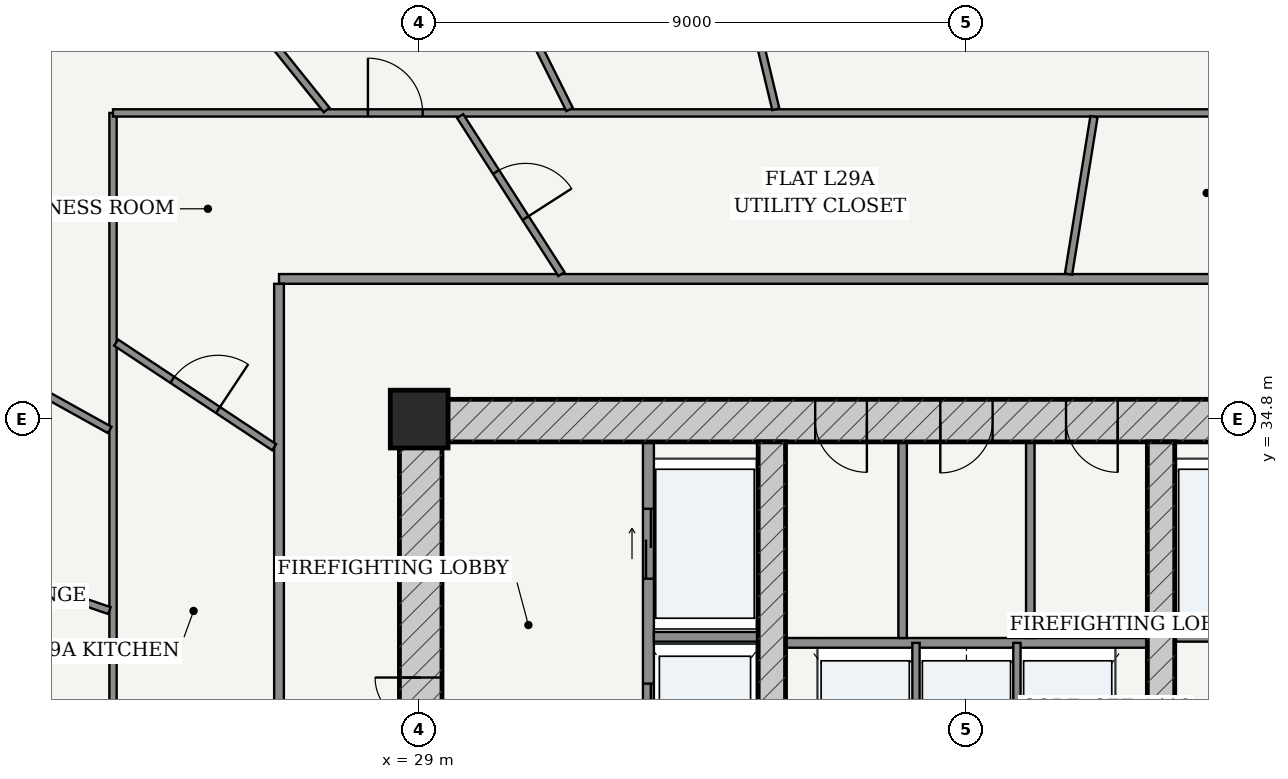
"""IFC4 building model, lengths in metres.
Left out: names, types, materials, properties, quantities, classifications, styles, units other than length and angle.
Written with IfcOpenShell. Run it as: python <this file> out.ifc"""

import sys

from ifc_helpers import new_model, si_unit, direction, frame, frame_2d, origin, origin_2d, place, context, subcontext, project, spatial, rectangle, extrude, source, transform, mapped, element, fill, save


model = new_model("IFC4")
c1 = context("Model", 3, precision=1e-05, world=origin(), true_north=direction((-0.2419218956, 0.970295726276)))
c2 = subcontext(c1, "Body", "Model", "MODEL_VIEW")
j1 = project(units=[si_unit("LENGTHUNIT", "METRE"), si_unit("PLANEANGLEUNIT", "RADIAN")], contexts=[c1])
p1 = place(None, origin())
s1 = spatial("IfcSite", under=j1, at=p1, CompositionType="ELEMENT")
p2 = place(p1, origin())
s2 = spatial("IfcBuilding", under=s1, at=p2, CompositionType="ELEMENT")
p3 = place(p2, frame((0.0, 0.0, 112.2)))
s3 = spatial("IfcBuildingStorey", under=s2, at=p3, CompositionType="ELEMENT", Elevation=112.2)
p4 = place(p3, frame((29.0, 34.8, 0.0), z_axis=(0.0, 0.0, 1.0), x_axis=(1.0, 0.0, 0.0)))
e1 = element("IfcColumn", 1, at=p4, inside=s3, PredefinedType="COLUMN", context=c2, shape_type="SweptSolid", body=[
    extrude(rectangle(XDim=0.95, YDim=0.95, at=origin_2d()), origin(), (0.0, 0.0, 1.0), 3.6),
])
p5 = place(p3, frame((28.675, 34.775, 0.0), z_axis=(0.0, 0.0, 1.0), x_axis=(1.0, 0.0, 0.0)))
e2 = element("IfcWall", 2, at=p5, inside=s3, PredefinedType="SHEAR", context=c2, shape_type="SweptSolid", body=[
    extrude(rectangle(XDim=18.65, YDim=0.7, at=frame_2d((9.325, 0.0))), origin(), (0.0, 0.0, 1.0), 3.325),
])
p6 = place(p5, frame((6.837, 0.0, 0.0)))
e3 = element("IfcOpeningElement", 3, at=p6, cuts=e2, PredefinedType="OPENING", context=c2, shape_type="SweptSolid", body=[
    extrude(rectangle(XDim=0.85, YDim=2.1, at=frame_2d((0.425, 1.05))), frame((0.0, 0.36, 0.0), z_axis=(0.0, -1.0, 0.0), x_axis=(1.0, 0.0, 0.0)), (0.0, 0.0, 1.0), 0.72),
])
p7 = place(p5, frame((8.895, 0.0, 0.0)))
e4 = element("IfcOpeningElement", 4, at=p7, cuts=e2, PredefinedType="OPENING", context=c2, shape_type="SweptSolid", body=[
    extrude(rectangle(XDim=0.86, YDim=2.1, at=frame_2d((0.43, 1.05))), frame((0.0, 0.36, 0.0), z_axis=(0.0, -1.0, 0.0), x_axis=(1.0, 0.0, 0.0)), (0.0, 0.0, 1.0), 0.72),
])
p8 = place(p5, frame((10.962, 0.0, 0.0)))
e5 = element("IfcOpeningElement", 5, at=p8, cuts=e2, PredefinedType="OPENING", context=c2, shape_type="SweptSolid", body=[
    extrude(rectangle(XDim=0.85, YDim=2.1, at=frame_2d((0.425, 1.05))), frame((0.0, 0.36, 0.0), z_axis=(0.0, -1.0, 0.0), x_axis=(1.0, 0.0, 0.0)), (0.0, 0.0, 1.0), 0.72),
])
p9 = place(p3, frame((29.025, 19.175, 0.0), z_axis=(0.0, 0.0, 1.0), x_axis=(0.0, 1.0, 0.0)))
e6 = element("IfcWall", 6, at=p9, inside=s3, PredefinedType="SHEAR", context=c2, shape_type="SweptSolid", body=[
    extrude(rectangle(XDim=15.25, YDim=0.7, at=frame_2d((7.625, 0.0))), origin(), (0.0, 0.0, 1.0), 3.325),
])
p10 = place(p9, frame((9.875, 0.0, 0.0)))
e7 = element("IfcOpeningElement", 7, at=p10, cuts=e6, PredefinedType="OPENING", context=c2, shape_type="SweptSolid", body=[
    extrude(rectangle(XDim=1.5, YDim=2.2, at=frame_2d((0.75, 1.1))), frame((0.0, 0.36, 0.0), z_axis=(0.0, -1.0, 0.0), x_axis=(1.0, 0.0, 0.0)), (0.0, 0.0, 1.0), 0.72),
])
p11 = place(p3, frame((34.8, 19.175, 0.0), z_axis=(0.0, 0.0, 1.0), x_axis=(0.0, 1.0, 0.0)))
e8 = element("IfcWall", 8, at=p11, inside=s3, PredefinedType="SHEAR", context=c2, shape_type="SweptSolid", body=[
    extrude(rectangle(XDim=15.25, YDim=0.45, at=frame_2d((7.625, 0.0))), origin(), (0.0, 0.0, 1.0), 3.325),
])
p12 = place(p11, frame((7.8, 0.0, 0.0)))
e9 = element("IfcOpeningElement", 9, at=p12, cuts=e8, PredefinedType="OPENING", context=c2, shape_type="SweptSolid", body=[
    extrude(rectangle(XDim=1.05, YDim=2.15, at=frame_2d((0.525, 1.075))), frame((0.0, 0.235, 0.0), z_axis=(0.0, -1.0, 0.0), x_axis=(1.0, 0.0, 0.0)), (0.0, 0.0, 1.0), 0.47),
])
p13 = place(p3, frame((41.2, 19.175, 0.0), z_axis=(0.0, 0.0, 1.0), x_axis=(0.0, 1.0, 0.0)))
e10 = element("IfcWall", 10, at=p13, inside=s3, PredefinedType="SHEAR", context=c2, shape_type="SweptSolid", body=[
    extrude(rectangle(XDim=15.25, YDim=0.45, at=frame_2d((7.625, 0.0))), origin(), (0.0, 0.0, 1.0), 3.325),
])
p14 = place(p13, frame((7.8, 0.0, 0.0)))
e11 = element("IfcOpeningElement", 11, at=p14, cuts=e10, PredefinedType="OPENING", context=c2, shape_type="SweptSolid", body=[
    extrude(rectangle(XDim=1.05, YDim=2.15, at=frame_2d((0.525, 1.075))), frame((0.0, 0.235, 0.0), z_axis=(0.0, -1.0, 0.0), x_axis=(1.0, 0.0, 0.0)), (0.0, 0.0, 1.0), 0.47),
])
p15 = place(p3, frame((23.3, 45.202, 0.0), z_axis=(0.0, 0.0, 1.0), x_axis=(-0.769242574941, -0.638956853706, 0.0)))
e12 = element("IfcWall", 12, at=p15, inside=s3, PredefinedType="SOLIDWALL", context=c2, shape_type="SweptSolid", body=[
    extrude(rectangle(XDim=9.69, YDim=0.28, at=frame_2d((4.845, 0.0))), origin(), (0.0, 0.0, 1.0), 3.325),
])
p16 = place(p15, frame((1.566, 0.0, 0.85)))
e13 = element("IfcOpeningElement", 13, at=p16, cuts=e12, PredefinedType="OPENING", context=c2, shape_type="SweptSolid", body=[
    extrude(rectangle(XDim=2.1, YDim=1.95, at=frame_2d((1.05, 0.975))), frame((0.0, 0.15, 0.0), z_axis=(0.0, -1.0, 0.0), x_axis=(1.0, 0.0, 0.0)), (0.0, 0.0, 1.0), 0.3),
])
p17 = place(p15, frame((6.023, 0.0, 0.85)))
e14 = element("IfcOpeningElement", 14, at=p17, cuts=e12, PredefinedType="OPENING", context=c2, shape_type="SweptSolid", body=[
    extrude(rectangle(XDim=2.1, YDim=1.95, at=frame_2d((1.05, 0.975))), frame((0.0, 0.15, 0.0), z_axis=(0.0, -1.0, 0.0), x_axis=(1.0, 0.0, 0.0)), (0.0, 0.0, 1.0), 0.3),
])
p18 = place(p3, frame((32.77, 28.52, 0.0), z_axis=(0.0, 0.0, 1.0), x_axis=(0.0, 1.0, 0.0)))
e15 = element("IfcWall", 15, at=p18, inside=s3, PredefinedType="PARTITIONING", context=c2, shape_type="SweptSolid", body=[
    extrude(rectangle(XDim=5.905, YDim=0.18, at=frame_2d((2.953, 0.0))), origin(), (0.0, 0.0, 1.0), 3.325),
])
p19 = place(p18, frame((3.655, 0.0, 0.0)))
e16 = element("IfcOpeningElement", 16, at=p19, cuts=e15, PredefinedType="OPENING", context=c2, shape_type="SweptSolid", body=[
    extrude(rectangle(XDim=1.15, YDim=2.2, at=frame_2d((0.575, 1.1))), frame((0.0, 0.1, 0.0), z_axis=(0.0, -1.0, 0.0), x_axis=(1.0, 0.0, 0.0)), (0.0, 0.0, 1.0), 0.2),
])
p20 = place(p18, frame((0.73, 0.0, 0.0)))
e17 = element("IfcOpeningElement", 17, at=p20, cuts=e15, PredefinedType="OPENING", context=c2, shape_type="SweptSolid", body=[
    extrude(rectangle(XDim=1.2, YDim=2.25, at=frame_2d((0.6, 1.125))), frame((0.0, 0.1, 0.0), z_axis=(0.0, -1.0, 0.0), x_axis=(1.0, 0.0, 0.0)), (0.0, 0.0, 1.0), 0.2),
])
for number, where, z_axis, x_axis in (
    (18, (32.86, 31.22, 0.0), (0.0, 0.0, 1.0), (1.0, 0.0, 0.0)),
    (19, (41.425, 31.22, 0.0), (0.0, 0.0, 1.0), (1.0, 0.0, 0.0)),
):
    element("IfcWall", number, at=place(p3, frame(where, z_axis=z_axis, x_axis=x_axis)), inside=s3, PredefinedType="PARTITIONING", context=c2, shape_type="SweptSolid", body=[
        extrude(rectangle(XDim=1.715, YDim=0.16, at=frame_2d((0.857, 0.0))), origin(), (0.0, 0.0, 1.0), 3.325),
    ])
p21 = place(p3, frame((35.025, 31.12, 0.0), z_axis=(0.0, 0.0, 1.0), x_axis=(1.0, 0.0, 0.0)))
e20 = element("IfcWall", 20, at=p21, inside=s3, PredefinedType="PARTITIONING", context=c2, shape_type="SweptSolid", body=[
    extrude(rectangle(XDim=5.95, YDim=0.16, at=frame_2d((2.975, 0.0))), origin(), (0.0, 0.0, 1.0), 3.325),
])
for number, where, z_axis, x_axis in (
    (21, (37.17, 28.56, 0.0), (0.0, 0.0, 1.0), (0.0, 1.0, 0.0)),
    (22, (38.83, 28.56, 0.0), (0.0, 0.0, 1.0), (0.0, 1.0, 0.0)),
):
    element("IfcWall", number, at=place(p3, frame(where, z_axis=z_axis, x_axis=x_axis)), inside=s3, PredefinedType="PARTITIONING", context=c2, shape_type="SweptSolid", body=[
        extrude(rectangle(XDim=2.56, YDim=0.12, at=frame_2d((1.28, 0.0))), origin(), (0.0, 0.0, 1.0), 3.325),
    ])
for number, where, z_axis, x_axis in (
    (23, (36.95, 31.2, 0.0), (0.0, 0.0, 1.0), (0.0, 1.0, 0.0)),
    (24, (39.05, 31.2, 0.0), (0.0, 0.0, 1.0), (0.0, 1.0, 0.0)),
):
    element("IfcWall", number, at=place(p3, frame(where, z_axis=z_axis, x_axis=x_axis)), inside=s3, PredefinedType="PARTITIONING", context=c2, shape_type="SweptSolid", body=[
        extrude(rectangle(XDim=3.225, YDim=0.14, at=frame_2d((1.613, 0.0))), origin(), (0.0, 0.0, 1.0), 3.325),
    ])
p22 = place(p3, frame((26.695, 37.105, 0.0), z_axis=(0.0, 0.0, 1.0), x_axis=(1.0, 0.0, 0.0)))
e25 = element("IfcWall", 25, at=p22, inside=s3, PredefinedType="PARTITIONING", context=c2, shape_type="SweptSolid", body=[
    extrude(rectangle(XDim=22.61, YDim=0.16, at=frame_2d((11.305, 0.0))), origin(), (0.0, 0.0, 1.0), 2.767),
])
p23 = place(p3, frame((26.695, 16.575, 0.0), z_axis=(0.0, 0.0, 1.0), x_axis=(0.0, 1.0, 0.0)))
e26 = element("IfcWall", 26, at=p23, inside=s3, PredefinedType="PARTITIONING", context=c2, shape_type="SweptSolid", body=[
    extrude(rectangle(XDim=20.45, YDim=0.16, at=frame_2d((10.225, 0.0))), origin(), (0.0, 0.0, 1.0), 2.767),
])
p24 = place(p23, frame((2.424, 0.0, 0.0)))
e27 = element("IfcOpeningElement", 27, at=p24, cuts=e26, PredefinedType="OPENING", context=c2, shape_type="SweptSolid", body=[
    extrude(rectangle(XDim=0.98, YDim=2.2, at=frame_2d((0.49, 1.1))), frame((0.0, 0.09, 0.0), z_axis=(0.0, -1.0, 0.0), x_axis=(1.0, 0.0, 0.0)), (0.0, 0.0, 1.0), 0.18),
])
p25 = place(p3, frame((23.965, 13.765, 0.0), z_axis=(0.0, 0.0, 1.0), x_axis=(0.0, 1.0, 0.0)))
e28 = element("IfcWall", 28, at=p25, inside=s3, PredefinedType="PARTITIONING", context=c2, shape_type="SweptSolid", body=[
    extrude(rectangle(XDim=26.07, YDim=0.12, at=frame_2d((13.035, 0.0))), origin(), (0.0, 0.0, 1.0), 2.767),
])
p26 = place(p25, frame((3.362, 0.0, 0.0)))
e29 = element("IfcOpeningElement", 29, at=p26, cuts=e28, PredefinedType="OPENING", context=c2, shape_type="SweptSolid", body=[
    extrude(rectangle(XDim=0.9, YDim=2.15, at=frame_2d((0.45, 1.075))), frame((0.0, 0.07, 0.0), z_axis=(0.0, -1.0, 0.0), x_axis=(1.0, 0.0, 0.0)), (0.0, 0.0, 1.0), 0.14),
])
p27 = place(p25, frame((13.924, 0.0, 0.0)))
e30 = element("IfcOpeningElement", 30, at=p27, cuts=e28, PredefinedType="OPENING", context=c2, shape_type="SweptSolid", body=[
    extrude(rectangle(XDim=0.9, YDim=2.15, at=frame_2d((0.45, 1.075))), frame((0.0, 0.07, 0.0), z_axis=(0.0, -1.0, 0.0), x_axis=(1.0, 0.0, 0.0)), (0.0, 0.0, 1.0), 0.14),
])
p28 = place(p3, frame((23.965, 39.835, 0.0), z_axis=(0.0, 0.0, 1.0), x_axis=(1.0, 0.0, 0.0)))
e31 = element("IfcWall", 31, at=p28, inside=s3, PredefinedType="PARTITIONING", context=c2, shape_type="SweptSolid", body=[
    extrude(rectangle(XDim=24.416, YDim=0.12, at=frame_2d((12.208, 0.0))), origin(), (0.0, 0.0, 1.0), 2.767),
])
p29 = place(p28, frame((4.192, 0.0, 0.0)))
e32 = element("IfcOpeningElement", 32, at=p29, cuts=e31, PredefinedType="OPENING", context=c2, shape_type="SweptSolid", body=[
    extrude(rectangle(XDim=0.9, YDim=2.15, at=frame_2d((0.45, 1.075))), frame((0.0, 0.07, 0.0), z_axis=(0.0, -1.0, 0.0), x_axis=(1.0, 0.0, 0.0)), (0.0, 0.0, 1.0), 0.14),
])
p30 = place(p28, frame((19.728, 0.0, 0.0)))
e33 = element("IfcOpeningElement", 33, at=p30, cuts=e31, PredefinedType="OPENING", context=c2, shape_type="SweptSolid", body=[
    extrude(rectangle(XDim=0.86, YDim=2.15, at=frame_2d((0.43, 1.075))), frame((0.0, 0.07, 0.0), z_axis=(0.0, -1.0, 0.0), x_axis=(1.0, 0.0, 0.0)), (0.0, 0.0, 1.0), 0.14),
])
p31 = place(p3, frame((34.865, 39.895, 0.0), z_axis=(0.0, 0.0, 1.0), x_axis=(-0.23282725047, 0.97251810854, 0.0)))
e34 = element("IfcWall", 34, at=p31, inside=s3, PredefinedType="PARTITIONING", context=c2, shape_type="SweptSolid", body=[
    extrude(rectangle(XDim=8.715, YDim=0.12, at=frame_2d((4.357, 0.0))), origin(), (0.0, 0.0, 1.0), 2.767),
])
p32 = place(p31, frame((2.831, 0.0, 0.0)))
e35 = element("IfcOpeningElement", 35, at=p32, cuts=e34, PredefinedType="OPENING", context=c2, shape_type="SweptSolid", body=[
    extrude(rectangle(XDim=0.9, YDim=2.15, at=frame_2d((0.45, 1.075))), frame((0.0, 0.07, 0.0), z_axis=(0.0, -1.0, 0.0), x_axis=(1.0, 0.0, 0.0)), (0.0, 0.0, 1.0), 0.14),
])
p33 = place(p3, frame((31.474, 39.89, 0.0), z_axis=(0.0, 0.0, 1.0), x_axis=(-0.446167584581, 0.894949432353, 0.0)))
e36 = element("IfcWall", 36, at=p33, inside=s3, PredefinedType="PARTITIONING", context=c2, shape_type="SweptSolid", body=[
    extrude(rectangle(XDim=8.125, YDim=0.12, at=frame_2d((4.062, 0.0))), origin(), (0.0, 0.0, 1.0), 2.767),
])
p34 = place(p33, frame((3.612, 0.0, 0.0)))
e37 = element("IfcOpeningElement", 37, at=p34, cuts=e36, PredefinedType="OPENING", context=c2, shape_type="SweptSolid", body=[
    extrude(rectangle(XDim=0.9, YDim=2.15, at=frame_2d((0.45, 1.075))), frame((0.0, 0.07, 0.0), z_axis=(0.0, -1.0, 0.0), x_axis=(1.0, 0.0, 0.0)), (0.0, 0.0, 1.0), 0.14),
])
p35 = place(p3, frame((27.478, 39.883, 0.0), z_axis=(0.0, 0.0, 1.0), x_axis=(-0.62672583251, 0.779239841682, 0.0)))
e38 = element("IfcWall", 38, at=p35, inside=s3, PredefinedType="PARTITIONING", context=c2, shape_type="SweptSolid", body=[
    extrude(rectangle(XDim=6.678, YDim=0.12, at=frame_2d((3.339, 0.0))), origin(), (0.0, 0.0, 1.0), 2.767),
])
p36 = place(p35, frame((1.821, 0.0, 0.0)))
e39 = element("IfcOpeningElement", 39, at=p36, cuts=e38, PredefinedType="OPENING", context=c2, shape_type="SweptSolid", body=[
    extrude(rectangle(XDim=0.9, YDim=2.15, at=frame_2d((0.45, 1.075))), frame((0.0, 0.07, 0.0), z_axis=(0.0, -1.0, 0.0), x_axis=(1.0, 0.0, 0.0)), (0.0, 0.0, 1.0), 0.14),
])
p37 = place(p3, frame((23.911, 34.622, 0.0), z_axis=(0.0, 0.0, 1.0), x_axis=(-0.874324904351, 0.485341077626, 0.0)))
e40 = element("IfcWall", 40, at=p37, inside=s3, PredefinedType="PARTITIONING", context=c2, shape_type="SweptSolid", body=[
    extrude(rectangle(XDim=9.066, YDim=0.12, at=frame_2d((4.533, 0.0))), origin(), (0.0, 0.0, 1.0), 2.767),
])
p38 = place(p3, frame((23.906, 31.65, 0.0), z_axis=(0.0, 0.0, 1.0), x_axis=(-0.945573120726, 0.32540970078, 0.0)))
e41 = element("IfcWall", 41, at=p38, inside=s3, PredefinedType="PARTITIONING", context=c2, shape_type="SweptSolid", body=[
    extrude(rectangle(XDim=11.022, YDim=0.12, at=frame_2d((5.511, 0.0))), origin(), (0.0, 0.0, 1.0), 2.767),
])
p39 = place(p38, frame((5.061, 0.0, 0.0)))
e42 = element("IfcOpeningElement", 42, at=p39, cuts=e41, PredefinedType="OPENING", context=c2, shape_type="SweptSolid", body=[
    extrude(rectangle(XDim=0.9, YDim=2.15, at=frame_2d((0.45, 1.075))), frame((0.0, 0.07, 0.0), z_axis=(0.0, -1.0, 0.0), x_axis=(1.0, 0.0, 0.0)), (0.0, 0.0, 1.0), 0.14),
])
p40 = place(p3, frame((23.904, 29.13, 0.0), z_axis=(0.0, 0.0, 1.0), x_axis=(-0.986618264768, 0.163047231274, 0.0)))
e43 = element("IfcWall", 43, at=p40, inside=s3, PredefinedType="PARTITIONING", context=c2, shape_type="SweptSolid", body=[
    extrude(rectangle(XDim=12.039, YDim=0.12, at=frame_2d((6.02, 0.0))), origin(), (0.0, 0.0, 1.0), 2.767),
])
p41 = place(p40, frame((4.496, 0.0, 0.0)))
e44 = element("IfcOpeningElement", 44, at=p41, cuts=e43, PredefinedType="OPENING", context=c2, shape_type="SweptSolid", body=[
    extrude(rectangle(XDim=0.9, YDim=2.15, at=frame_2d((0.45, 1.075))), frame((0.0, 0.07, 0.0), z_axis=(0.0, -1.0, 0.0), x_axis=(1.0, 0.0, 0.0)), (0.0, 0.0, 1.0), 0.14),
])
p42 = place(p3, frame((39.679, 37.185, 0.0), z_axis=(0.0, 0.0, 1.0), x_axis=(0.159580767408, 0.98718487563, 0.0)))
e45 = element("IfcWall", 45, at=p42, inside=s3, PredefinedType="PARTITIONING", context=c2, shape_type="SweptSolid", body=[
    extrude(rectangle(XDim=2.622, YDim=0.12, at=frame_2d((1.311, 0.0))), origin(), (0.0, 0.0, 1.0), 3.325),
])
p43 = place(p3, frame((31.34, 37.185, 0.0), z_axis=(0.0, 0.0, 1.0), x_axis=(-0.539861631895, 0.841753775405, 0.0)))
e46 = element("IfcWall", 46, at=p43, inside=s3, PredefinedType="PARTITIONING", context=c2, shape_type="SweptSolid", body=[
    extrude(rectangle(XDim=3.086, YDim=0.12, at=frame_2d((1.543, 0.0))), origin(), (0.0, 0.0, 1.0), 3.325),
])
p44 = place(p43, frame((1.093, 0.0, 0.0)))
e47 = element("IfcOpeningElement", 47, at=p44, cuts=e46, PredefinedType="OPENING", context=c2, shape_type="SweptSolid", body=[
    extrude(rectangle(XDim=0.9, YDim=2.15, at=frame_2d((0.45, 1.075))), frame((0.0, 0.07, 0.0), z_axis=(0.0, -1.0, 0.0), x_axis=(1.0, 0.0, 0.0)), (0.0, 0.0, 1.0), 0.14),
])
p45 = place(p3, frame((26.615, 34.337, 0.0), z_axis=(0.0, 0.0, 1.0), x_axis=(-0.833829855758, 0.552021531868, 0.0)))
e48 = element("IfcWall", 48, at=p45, inside=s3, PredefinedType="PARTITIONING", context=c2, shape_type="SweptSolid", body=[
    extrude(rectangle(XDim=3.116, YDim=0.12, at=frame_2d((1.558, 0.0))), origin(), (0.0, 0.0, 1.0), 3.325),
])
p46 = place(p45, frame((1.108, 0.0, 0.0)))
e49 = element("IfcOpeningElement", 49, at=p46, cuts=e48, PredefinedType="OPENING", context=c2, shape_type="SweptSolid", body=[
    extrude(rectangle(XDim=0.9, YDim=2.15, at=frame_2d((0.45, 1.075))), frame((0.0, 0.07, 0.0), z_axis=(0.0, -1.0, 0.0), x_axis=(1.0, 0.0, 0.0)), (0.0, 0.0, 1.0), 0.14),
])
m1 = source(origin(), c2, "Body", "SweptSolid", [
    extrude(rectangle(XDim=1.5, YDim=2.2, at=frame_2d((0.75, 1.1))), frame((0.0, 0.025, 0.0), z_axis=(0.0, -1.0, 0.0), x_axis=(1.0, 0.0, 0.0)), (0.0, 0.0, 1.0), 0.05),
])
p47 = place(p10, origin())
e50 = element("IfcDoor", 50, at=p47, inside=s3, OperationType="DOUBLE_DOOR_SINGLE_SWING", PredefinedType="DOOR", context=c2, shape_type="MappedRepresentation", body=[
    mapped(m1, transform((0.0, 0.0, 0.0), scale=1.0)),
])
fill(e7, e50)
m2 = source(origin(), c2, "Body", "SweptSolid", [
    extrude(rectangle(XDim=0.85, YDim=2.1, at=frame_2d((0.425, 1.05))), frame((0.0, 0.025, 0.0), z_axis=(0.0, -1.0, 0.0), x_axis=(1.0, 0.0, 0.0)), (0.0, 0.0, 1.0), 0.05),
])
p48 = place(p6, frame((0.85, 0.0, 0.0), z_axis=(0.0, 0.0, 1.0), x_axis=(-1.0, 0.0, 0.0)))
e51 = element("IfcDoor", 51, at=p48, inside=s3, OperationType="SINGLE_SWING_LEFT", PredefinedType="DOOR", context=c2, shape_type="MappedRepresentation", body=[
    mapped(m2, transform((0.0, 0.0, 0.0), scale=1.0)),
])
fill(e3, e51)
m3 = source(origin(), c2, "Body", "SweptSolid", [
    extrude(rectangle(XDim=0.86, YDim=2.1, at=frame_2d((0.43, 1.05))), frame((0.0, 0.025, 0.0), z_axis=(0.0, -1.0, 0.0), x_axis=(1.0, 0.0, 0.0)), (0.0, 0.0, 1.0), 0.05),
])
p49 = place(p7, frame((0.86, 0.0, 0.0), z_axis=(0.0, 0.0, 1.0), x_axis=(-1.0, 0.0, 0.0)))
e52 = element("IfcDoor", 52, at=p49, inside=s3, OperationType="SINGLE_SWING_RIGHT", PredefinedType="DOOR", context=c2, shape_type="MappedRepresentation", body=[
    mapped(m3, transform((0.0, 0.0, 0.0), scale=1.0)),
])
fill(e4, e52)
p50 = place(p8, frame((0.85, 0.0, 0.0), z_axis=(0.0, 0.0, 1.0), x_axis=(-1.0, 0.0, 0.0)))
e53 = element("IfcDoor", 53, at=p50, inside=s3, OperationType="SINGLE_SWING_LEFT", PredefinedType="DOOR", context=c2, shape_type="MappedRepresentation", body=[
    mapped(m2, transform((0.0, 0.0, 0.0), scale=1.0)),
])
fill(e5, e53)
m4 = source(origin(), c2, "Body", "SweptSolid", [
    extrude(rectangle(XDim=1.15, YDim=2.2, at=frame_2d((0.575, 1.1))), frame((0.0, 0.025, 0.0), z_axis=(0.0, -1.0, 0.0), x_axis=(1.0, 0.0, 0.0)), (0.0, 0.0, 1.0), 0.05),
])
p51 = place(p19, origin())
e54 = element("IfcDoor", 54, at=p51, inside=s3, OperationType="DOUBLE_DOOR_SLIDING", PredefinedType="DOOR", context=c2, shape_type="MappedRepresentation", body=[
    mapped(m4, transform((0.0, 0.0, 0.0), scale=1.0)),
])
fill(e16, e54)
m5 = source(origin(), c2, "Body", "SweptSolid", [
    extrude(rectangle(XDim=1.2, YDim=2.25, at=frame_2d((0.6, 1.125))), frame((0.0, 0.025, 0.0), z_axis=(0.0, -1.0, 0.0), x_axis=(1.0, 0.0, 0.0)), (0.0, 0.0, 1.0), 0.05),
])
p52 = place(p20, origin())
e55 = element("IfcDoor", 55, at=p52, inside=s3, OperationType="DOUBLE_DOOR_SLIDING", PredefinedType="DOOR", context=c2, shape_type="MappedRepresentation", body=[
    mapped(m5, transform((0.0, 0.0, 0.0), scale=1.0)),
])
fill(e17, e55)
m6 = source(origin(), c2, "Body", "SweptSolid", [
    extrude(rectangle(XDim=0.9, YDim=2.15, at=frame_2d((0.45, 1.075))), frame((0.0, 0.025, 0.0), z_axis=(0.0, -1.0, 0.0), x_axis=(1.0, 0.0, 0.0)), (0.0, 0.0, 1.0), 0.05),
])
p53 = place(p46, frame((0.9, 0.0, 0.0), z_axis=(0.0, 0.0, 1.0), x_axis=(-1.0, 0.0, 0.0)))
e56 = element("IfcDoor", 56, at=p53, inside=s3, OperationType="SINGLE_SWING_RIGHT", PredefinedType="DOOR", context=c2, shape_type="MappedRepresentation", body=[
    mapped(m6, transform((0.0, 0.0, 0.0), scale=1.0)),
])
fill(e49, e56)
p54 = place(p29, origin())
e57 = element("IfcDoor", 57, at=p54, inside=s3, OperationType="SINGLE_SWING_LEFT", PredefinedType="DOOR", context=c2, shape_type="MappedRepresentation", body=[
    mapped(m6, transform((0.0, 0.0, 0.0), scale=1.0)),
])
fill(e32, e57)
p55 = place(p44, frame((0.9, 0.0, 0.0), z_axis=(0.0, 0.0, 1.0), x_axis=(-1.0, 0.0, 0.0)))
e58 = element("IfcDoor", 58, at=p55, inside=s3, OperationType="SINGLE_SWING_RIGHT", PredefinedType="DOOR", context=c2, shape_type="MappedRepresentation", body=[
    mapped(m6, transform((0.0, 0.0, 0.0), scale=1.0)),
])
fill(e47, e58)
save(model, sys.argv[1])
